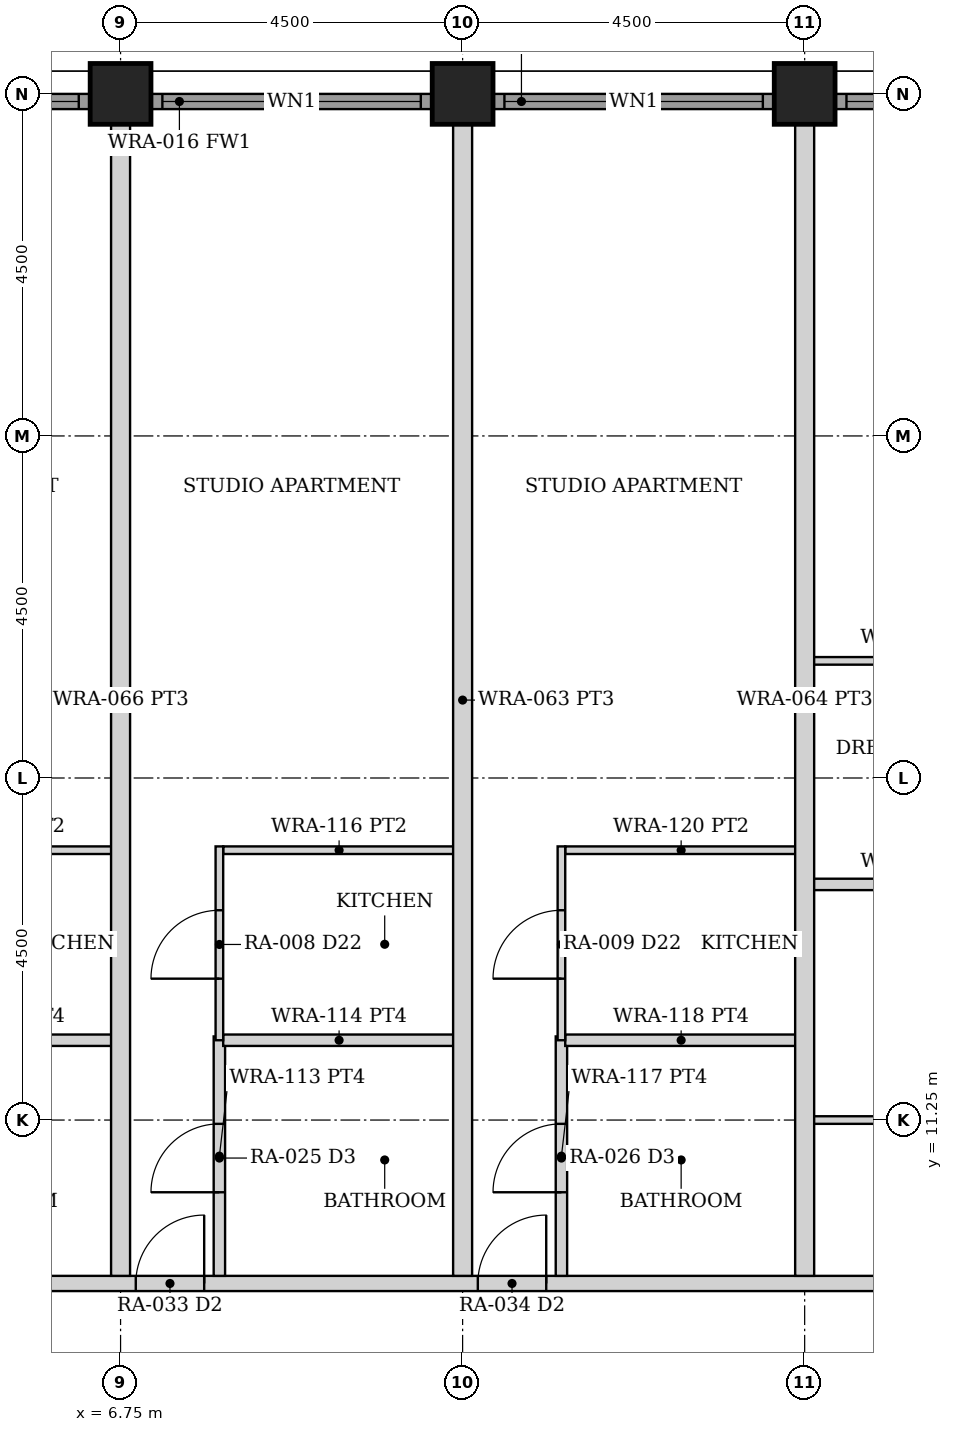
"""IFC4 building model, lengths in metres.
Left out: names, types, materials, properties, quantities, classifications, styles, units other than length and angle.
Written with IfcOpenShell. Run it as: python <this file> out.ifc"""

import sys

from ifc_helpers import new_model, si_unit, direction, frame, frame_2d, origin, origin_2d, place, context, subcontext, project, spatial, rectangle, hollow_rectangle, extrude, element, fill, save


model = new_model("IFC4")
c1 = context("Model", 3, precision=1e-05, world=origin(), true_north=direction((0.0, 1.0)))
c2 = subcontext(c1, "Body", "Model", "MODEL_VIEW")
j1 = project(units=[si_unit("LENGTHUNIT", "METRE"), si_unit("PLANEANGLEUNIT", "RADIAN")], contexts=[c1])
p1 = place(None, origin())
s1 = spatial("IfcSite", under=j1, at=p1, CompositionType="ELEMENT")
p2 = place(p1, origin())
s2 = spatial("IfcBuilding", under=s1, at=p2, CompositionType="ELEMENT")
p3 = place(p2, frame((0.0, 0.0, 26.5)))
s3 = spatial("IfcBuildingStorey", under=s2, at=p3, CompositionType="ELEMENT", Elevation=26.5)
for number, where, z_axis, x_axis in (
    (1, (6.75, 24.75, 0.0), (0.0, 0.0, 1.0), (0.0, 1.0, 0.0)),
    (2, (11.25, 24.75, 0.0), (0.0, 0.0, 1.0), (0.0, 1.0, 0.0)),
    (3, (15.75, 24.75, 0.0), (0.0, 0.0, 1.0), (0.0, 1.0, 0.0)),
):
    element("IfcColumn", number, at=place(p3, frame(where, z_axis=z_axis, x_axis=x_axis)), inside=s3, PredefinedType="COLUMN", context=c2, shape_type="SweptSolid", body=[
        extrude(hollow_rectangle(XDim=0.8, YDim=0.8, WallThickness=0.08, at=origin_2d()), origin(), (0.0, 0.0, 1.0), 3.5),
    ])
p4 = place(p3, frame((2.655, 24.65, 0.0), z_axis=(0.0, 0.0, 1.0), x_axis=(1.0, 0.0, 0.0)))
e4 = element("IfcWall", 4, at=p4, inside=s3, PredefinedType="SOLIDWALL", context=c2, shape_type="SweptSolid", body=[
    extrude(rectangle(XDim=3.69, YDim=0.2, at=frame_2d((1.845, 0.0))), origin(), (0.0, 0.0, 1.0), 2.379),
])
p5 = place(p4, frame((0.145, 0.0, 0.3)))
e5 = element("IfcOpeningElement", 5, at=p5, cuts=e4, PredefinedType="OPENING", context=c2, shape_type="SweptSolid", body=[
    extrude(rectangle(XDim=3.4, YDim=1.929, at=frame_2d((1.7, 0.964))), frame((0.0, 0.11, 0.0), z_axis=(0.0, -1.0, 0.0), x_axis=(1.0, 0.0, 0.0)), (0.0, 0.0, 1.0), 0.22),
])
p6 = place(p3, frame((7.155, 24.65, 0.0), z_axis=(0.0, 0.0, 1.0), x_axis=(1.0, 0.0, 0.0)))
e6 = element("IfcWall", 6, at=p6, inside=s3, PredefinedType="SOLIDWALL", context=c2, shape_type="SweptSolid", body=[
    extrude(rectangle(XDim=3.69, YDim=0.2, at=frame_2d((1.845, 0.0))), origin(), (0.0, 0.0, 1.0), 2.379),
])
p7 = place(p6, frame((0.145, 0.0, 0.3)))
e7 = element("IfcOpeningElement", 7, at=p7, cuts=e6, PredefinedType="OPENING", context=c2, shape_type="SweptSolid", body=[
    extrude(rectangle(XDim=3.4, YDim=1.929, at=frame_2d((1.7, 0.964))), frame((0.0, 0.11, 0.0), z_axis=(0.0, -1.0, 0.0), x_axis=(1.0, 0.0, 0.0)), (0.0, 0.0, 1.0), 0.22),
])
p8 = place(p3, frame((11.655, 24.65, 0.0), z_axis=(0.0, 0.0, 1.0), x_axis=(1.0, 0.0, 0.0)))
e8 = element("IfcWall", 8, at=p8, inside=s3, PredefinedType="SOLIDWALL", context=c2, shape_type="SweptSolid", body=[
    extrude(rectangle(XDim=3.69, YDim=0.2, at=frame_2d((1.845, 0.0))), origin(), (0.0, 0.0, 1.0), 2.379),
])
p9 = place(p8, frame((0.145, 0.0, 0.3)))
e9 = element("IfcOpeningElement", 9, at=p9, cuts=e8, PredefinedType="OPENING", context=c2, shape_type="SweptSolid", body=[
    extrude(rectangle(XDim=3.4, YDim=1.929, at=frame_2d((1.7, 0.964))), frame((0.0, 0.11, 0.0), z_axis=(0.0, -1.0, 0.0), x_axis=(1.0, 0.0, 0.0)), (0.0, 0.0, 1.0), 0.22),
])
p10 = place(p3, frame((16.155, 24.65, 0.0), z_axis=(0.0, 0.0, 1.0), x_axis=(1.0, 0.0, 0.0)))
e10 = element("IfcWall", 10, at=p10, inside=s3, PredefinedType="SOLIDWALL", context=c2, shape_type="SweptSolid", body=[
    extrude(rectangle(XDim=3.69, YDim=0.2, at=frame_2d((1.845, 0.0))), origin(), (0.0, 0.0, 1.0), 2.379),
])
p11 = place(p10, frame((0.145, 0.0, 0.3)))
e11 = element("IfcOpeningElement", 11, at=p11, cuts=e10, PredefinedType="OPENING", context=c2, shape_type="SweptSolid", body=[
    extrude(rectangle(XDim=3.4, YDim=1.929, at=frame_2d((1.7, 0.964))), frame((0.0, 0.11, 0.0), z_axis=(0.0, -1.0, 0.0), x_axis=(1.0, 0.0, 0.0)), (0.0, 0.0, 1.0), 0.22),
])
p12 = place(p3, frame((-24.55, 9.1, 0.0), z_axis=(0.0, 0.0, 1.0), x_axis=(1.0, 0.0, 0.0)))
e12 = element("IfcWall", 12, at=p12, inside=s3, PredefinedType="PARTITIONING", context=c2, shape_type="SweptSolid", body=[
    extrude(rectangle(XDim=49.1, YDim=0.2, at=frame_2d((24.55, 0.0))), origin(), (0.0, 0.0, 1.0), 2.373),
])
p13 = place(p12, frame((5.1, 0.0, 0.0)))
e13 = element("IfcOpeningElement", 13, at=p13, cuts=e12, PredefinedType="OPENING", context=c2, shape_type="SweptSolid", body=[
    extrude(rectangle(XDim=0.9, YDim=2.1, at=frame_2d((0.45, 1.05))), frame((0.0, 0.11, 0.0), z_axis=(0.0, -1.0, 0.0), x_axis=(1.0, 0.0, 0.0)), (0.0, 0.0, 1.0), 0.22),
])
p14 = place(p12, frame((9.0, 0.0, 0.0)))
e14 = element("IfcOpeningElement", 14, at=p14, cuts=e12, PredefinedType="OPENING", context=c2, shape_type="SweptSolid", body=[
    extrude(rectangle(XDim=0.9, YDim=2.1, at=frame_2d((0.45, 1.05))), frame((0.0, 0.11, 0.0), z_axis=(0.0, -1.0, 0.0), x_axis=(1.0, 0.0, 0.0)), (0.0, 0.0, 1.0), 0.22),
])
p15 = place(p12, frame((13.5, 0.0, 0.0)))
e15 = element("IfcOpeningElement", 15, at=p15, cuts=e12, PredefinedType="OPENING", context=c2, shape_type="SweptSolid", body=[
    extrude(rectangle(XDim=0.9, YDim=2.1, at=frame_2d((0.45, 1.05))), frame((0.0, 0.11, 0.0), z_axis=(0.0, -1.0, 0.0), x_axis=(1.0, 0.0, 0.0)), (0.0, 0.0, 1.0), 0.22),
])
p16 = place(p12, frame((18.0, 0.0, 0.0)))
e16 = element("IfcOpeningElement", 16, at=p16, cuts=e12, PredefinedType="OPENING", context=c2, shape_type="SweptSolid", body=[
    extrude(rectangle(XDim=0.9, YDim=2.1, at=frame_2d((0.45, 1.05))), frame((0.0, 0.11, 0.0), z_axis=(0.0, -1.0, 0.0), x_axis=(1.0, 0.0, 0.0)), (0.0, 0.0, 1.0), 0.22),
])
p17 = place(p12, frame((22.5, 0.0, 0.0)))
e17 = element("IfcOpeningElement", 17, at=p17, cuts=e12, PredefinedType="OPENING", context=c2, shape_type="SweptSolid", body=[
    extrude(rectangle(XDim=0.9, YDim=2.1, at=frame_2d((0.45, 1.05))), frame((0.0, 0.11, 0.0), z_axis=(0.0, -1.0, 0.0), x_axis=(1.0, 0.0, 0.0)), (0.0, 0.0, 1.0), 0.22),
])
p18 = place(p12, frame((27.0, 0.0, 0.0)))
e18 = element("IfcOpeningElement", 18, at=p18, cuts=e12, PredefinedType="OPENING", context=c2, shape_type="SweptSolid", body=[
    extrude(rectangle(XDim=0.9, YDim=2.1, at=frame_2d((0.45, 1.05))), frame((0.0, 0.11, 0.0), z_axis=(0.0, -1.0, 0.0), x_axis=(1.0, 0.0, 0.0)), (0.0, 0.0, 1.0), 0.22),
])
p19 = place(p12, frame((31.5, 0.0, 0.0)))
e19 = element("IfcOpeningElement", 19, at=p19, cuts=e12, PredefinedType="OPENING", context=c2, shape_type="SweptSolid", body=[
    extrude(rectangle(XDim=0.9, YDim=2.1, at=frame_2d((0.45, 1.05))), frame((0.0, 0.11, 0.0), z_axis=(0.0, -1.0, 0.0), x_axis=(1.0, 0.0, 0.0)), (0.0, 0.0, 1.0), 0.22),
])
p20 = place(p12, frame((36.0, 0.0, 0.0)))
e20 = element("IfcOpeningElement", 20, at=p20, cuts=e12, PredefinedType="OPENING", context=c2, shape_type="SweptSolid", body=[
    extrude(rectangle(XDim=0.9, YDim=2.1, at=frame_2d((0.45, 1.05))), frame((0.0, 0.11, 0.0), z_axis=(0.0, -1.0, 0.0), x_axis=(1.0, 0.0, 0.0)), (0.0, 0.0, 1.0), 0.22),
])
p21 = place(p12, frame((43.1, 0.0, 0.0)))
e21 = element("IfcOpeningElement", 21, at=p21, cuts=e12, PredefinedType="OPENING", context=c2, shape_type="SweptSolid", body=[
    extrude(rectangle(XDim=0.9, YDim=2.1, at=frame_2d((0.45, 1.05))), frame((0.0, 0.11, 0.0), z_axis=(0.0, -1.0, 0.0), x_axis=(1.0, 0.0, 0.0)), (0.0, 0.0, 1.0), 0.22),
])
p22 = place(p3, frame((3.6, 12.3, 0.0), z_axis=(0.0, 0.0, 1.0), x_axis=(1.0, 0.0, 0.0)))
e22 = element("IfcWall", 22, at=p22, inside=s3, PredefinedType="PARTITIONING", context=c2, shape_type="SweptSolid", body=[
    extrude(rectangle(XDim=3.05, YDim=0.15, at=frame_2d((1.525, 0.0))), origin(), (0.0, 0.0, 1.0), 2.373),
])
p23 = place(p3, frame((3.6, 14.8, 0.0), z_axis=(0.0, 0.0, 1.0), x_axis=(1.0, 0.0, 0.0)))
e23 = element("IfcWall", 23, at=p23, inside=s3, PredefinedType="PARTITIONING", context=c2, shape_type="SweptSolid", body=[
    extrude(rectangle(XDim=3.05, YDim=0.1, at=frame_2d((1.525, 0.0))), origin(), (0.0, 0.0, 1.0), 2.373),
])
p24 = place(p3, frame((8.05, 9.2, 0.0), z_axis=(0.0, 0.0, 1.0), x_axis=(0.0, 1.0, 0.0)))
e24 = element("IfcWall", 24, at=p24, inside=s3, PredefinedType="PARTITIONING", context=c2, shape_type="SweptSolid", body=[
    extrude(rectangle(XDim=3.15, YDim=0.15, at=frame_2d((1.575, 0.0))), origin(), (0.0, 0.0, 1.0), 2.373),
])
p25 = place(p24, frame((1.1, 0.0, 0.0)))
e25 = element("IfcOpeningElement", 25, at=p25, cuts=e24, PredefinedType="OPENING", context=c2, shape_type="SweptSolid", body=[
    extrude(rectangle(XDim=0.9, YDim=2.1, at=frame_2d((0.45, 1.05))), frame((0.0, 0.085, 0.0), z_axis=(0.0, -1.0, 0.0), x_axis=(1.0, 0.0, 0.0)), (0.0, 0.0, 1.0), 0.17),
])
p26 = place(p3, frame((8.1, 12.3, 0.0), z_axis=(0.0, 0.0, 1.0), x_axis=(1.0, 0.0, 0.0)))
e26 = element("IfcWall", 26, at=p26, inside=s3, PredefinedType="PARTITIONING", context=c2, shape_type="SweptSolid", body=[
    extrude(rectangle(XDim=3.05, YDim=0.15, at=frame_2d((1.525, 0.0))), origin(), (0.0, 0.0, 1.0), 2.373),
])
p27 = place(p3, frame((8.1, 14.8, 0.0), z_axis=(0.0, 0.0, 1.0), x_axis=(1.0, 0.0, 0.0)))
e27 = element("IfcWall", 27, at=p27, inside=s3, PredefinedType="PARTITIONING", context=c2, shape_type="SweptSolid", body=[
    extrude(rectangle(XDim=3.05, YDim=0.1, at=frame_2d((1.525, 0.0))), origin(), (0.0, 0.0, 1.0), 2.373),
])
p28 = place(p3, frame((8.05, 12.3, 0.0), z_axis=(0.0, 0.0, 1.0), x_axis=(0.0, 1.0, 0.0)))
e28 = element("IfcWall", 28, at=p28, inside=s3, PredefinedType="PARTITIONING", context=c2, shape_type="SweptSolid", body=[
    extrude(rectangle(XDim=2.55, YDim=0.1, at=frame_2d((1.275, 0.0))), origin(), (0.0, 0.0, 1.0), 2.373),
])
p29 = place(p28, frame((0.81, 0.0, 0.0)))
e29 = element("IfcOpeningElement", 29, at=p29, cuts=e28, PredefinedType="OPENING", context=c2, shape_type="SweptSolid", body=[
    extrude(rectangle(XDim=0.9, YDim=2.1, at=frame_2d((0.45, 1.05))), frame((0.0, 0.06, 0.0), z_axis=(0.0, -1.0, 0.0), x_axis=(1.0, 0.0, 0.0)), (0.0, 0.0, 1.0), 0.12),
])
p30 = place(p3, frame((12.55, 9.2, 0.0), z_axis=(0.0, 0.0, 1.0), x_axis=(0.0, 1.0, 0.0)))
e30 = element("IfcWall", 30, at=p30, inside=s3, PredefinedType="PARTITIONING", context=c2, shape_type="SweptSolid", body=[
    extrude(rectangle(XDim=3.15, YDim=0.15, at=frame_2d((1.575, 0.0))), origin(), (0.0, 0.0, 1.0), 2.373),
])
p31 = place(p30, frame((1.1, 0.0, 0.0)))
e31 = element("IfcOpeningElement", 31, at=p31, cuts=e30, PredefinedType="OPENING", context=c2, shape_type="SweptSolid", body=[
    extrude(rectangle(XDim=0.9, YDim=2.1, at=frame_2d((0.45, 1.05))), frame((0.0, 0.085, 0.0), z_axis=(0.0, -1.0, 0.0), x_axis=(1.0, 0.0, 0.0)), (0.0, 0.0, 1.0), 0.17),
])
p32 = place(p3, frame((12.6, 12.3, 0.0), z_axis=(0.0, 0.0, 1.0), x_axis=(1.0, 0.0, 0.0)))
e32 = element("IfcWall", 32, at=p32, inside=s3, PredefinedType="PARTITIONING", context=c2, shape_type="SweptSolid", body=[
    extrude(rectangle(XDim=3.05, YDim=0.15, at=frame_2d((1.525, 0.0))), origin(), (0.0, 0.0, 1.0), 2.373),
])
p33 = place(p3, frame((12.6, 14.8, 0.0), z_axis=(0.0, 0.0, 1.0), x_axis=(1.0, 0.0, 0.0)))
e33 = element("IfcWall", 33, at=p33, inside=s3, PredefinedType="PARTITIONING", context=c2, shape_type="SweptSolid", body=[
    extrude(rectangle(XDim=3.05, YDim=0.1, at=frame_2d((1.525, 0.0))), origin(), (0.0, 0.0, 1.0), 2.373),
])
p34 = place(p3, frame((12.55, 12.3, 0.0), z_axis=(0.0, 0.0, 1.0), x_axis=(0.0, 1.0, 0.0)))
e34 = element("IfcWall", 34, at=p34, inside=s3, PredefinedType="PARTITIONING", context=c2, shape_type="SweptSolid", body=[
    extrude(rectangle(XDim=2.55, YDim=0.1, at=frame_2d((1.275, 0.0))), origin(), (0.0, 0.0, 1.0), 2.373),
])
p35 = place(p34, frame((0.81, 0.0, 0.0)))
e35 = element("IfcOpeningElement", 35, at=p35, cuts=e34, PredefinedType="OPENING", context=c2, shape_type="SweptSolid", body=[
    extrude(rectangle(XDim=0.9, YDim=2.1, at=frame_2d((0.45, 1.05))), frame((0.0, 0.06, 0.0), z_axis=(0.0, -1.0, 0.0), x_axis=(1.0, 0.0, 0.0)), (0.0, 0.0, 1.0), 0.12),
])
p36 = place(p3, frame((15.85, 11.25, 0.0), z_axis=(0.0, 0.0, 1.0), x_axis=(1.0, 0.0, 0.0)))
e36 = element("IfcWall", 36, at=p36, inside=s3, PredefinedType="PARTITIONING", context=c2, shape_type="SweptSolid", body=[
    extrude(rectangle(XDim=8.5, YDim=0.1, at=frame_2d((4.25, 0.0))), origin(), (0.0, 0.0, 1.0), 2.373),
])
p37 = place(p36, frame((5.225, 0.0, 0.0)))
e37 = element("IfcOpeningElement", 37, at=p37, cuts=e36, PredefinedType="OPENING", context=c2, shape_type="SweptSolid", body=[
    extrude(rectangle(XDim=0.9, YDim=2.1, at=frame_2d((0.45, 1.05))), frame((0.0, 0.06, 0.0), z_axis=(0.0, -1.0, 0.0), x_axis=(1.0, 0.0, 0.0)), (0.0, 0.0, 1.0), 0.12),
])
p38 = place(p36, frame((7.25, 0.0, 0.0)))
e38 = element("IfcOpeningElement", 38, at=p38, cuts=e36, PredefinedType="OPENING", context=c2, shape_type="SweptSolid", body=[
    extrude(rectangle(XDim=0.9, YDim=2.1, at=frame_2d((0.45, 1.05))), frame((0.0, 0.06, 0.0), z_axis=(0.0, -1.0, 0.0), x_axis=(1.0, 0.0, 0.0)), (0.0, 0.0, 1.0), 0.12),
])
p39 = place(p36, frame((3.325, 0.0, 0.0)))
e39 = element("IfcOpeningElement", 39, at=p39, cuts=e36, PredefinedType="OPENING", context=c2, shape_type="SweptSolid", body=[
    extrude(rectangle(XDim=0.85, YDim=2.1, at=frame_2d((0.425, 1.05))), frame((0.0, 0.06, 0.0), z_axis=(0.0, -1.0, 0.0), x_axis=(1.0, 0.0, 0.0)), (0.0, 0.0, 1.0), 0.12),
])
p40 = place(p36, frame((1.08, 0.0, 0.0)))
e40 = element("IfcOpeningElement", 40, at=p40, cuts=e36, PredefinedType="OPENING", context=c2, shape_type="SweptSolid", body=[
    extrude(rectangle(XDim=0.9, YDim=2.1, at=frame_2d((0.45, 1.05))), frame((0.0, 0.06, 0.0), z_axis=(0.0, -1.0, 0.0), x_axis=(1.0, 0.0, 0.0)), (0.0, 0.0, 1.0), 0.12),
])
p41 = place(p3, frame((15.81, 14.35, 0.0), z_axis=(0.0, 0.0, 1.0), x_axis=(1.0, 0.0, 0.0)))
e41 = element("IfcWall", 41, at=p41, inside=s3, PredefinedType="PARTITIONING", context=c2, shape_type="SweptSolid", body=[
    extrude(rectangle(XDim=3.14, YDim=0.15, at=frame_2d((1.57, 0.0))), origin(), (0.0, 0.0, 1.0), 2.373),
])
p42 = place(p3, frame((15.81, 17.291, 0.0), z_axis=(0.0, 0.0, 1.0), x_axis=(1.0, 0.0, 0.0)))
e42 = element("IfcWall", 42, at=p42, inside=s3, PredefinedType="PARTITIONING", context=c2, shape_type="SweptSolid", body=[
    extrude(rectangle(XDim=3.14, YDim=0.1, at=frame_2d((1.57, 0.0))), origin(), (0.0, 0.0, 1.0), 2.373),
])
for number, where, z_axis, x_axis in (
    (43, (6.75, 9.2, 0.0), (0.0, 0.0, 1.0), (0.0, 1.0, 0.0)),
    (44, (11.25, 9.2, 0.0), (0.0, 0.0, 1.0), (0.0, 1.0, 0.0)),
    (45, (15.75, 9.2, 0.0), (0.0, 0.0, 1.0), (0.0, 1.0, 0.0)),
):
    element("IfcWall", number, at=place(p3, frame(where, z_axis=z_axis, x_axis=x_axis)), inside=s3, PredefinedType="PARTITIONING", context=c2, shape_type="SweptSolid", body=[
        extrude(rectangle(XDim=15.15, YDim=0.25, at=frame_2d((7.575, 0.0))), origin(), (0.0, 0.0, 1.0), 2.373),
    ])
p43 = place(p5, origin())
e46 = element("IfcWindow", 46, at=p43, inside=s3, PartitioningType="SINGLE_PANEL", PredefinedType="WINDOW", context=c2, shape_type="SweptSolid", body=[
    extrude(rectangle(XDim=3.4, YDim=1.929, at=frame_2d((1.7, 0.964))), frame((0.0, 0.03, 0.0), z_axis=(0.0, -1.0, 0.0), x_axis=(1.0, 0.0, 0.0)), (0.0, 0.0, 1.0), 0.06),
])
fill(e5, e46)
p44 = place(p7, origin())
e47 = element("IfcWindow", 47, at=p44, inside=s3, PartitioningType="SINGLE_PANEL", PredefinedType="WINDOW", context=c2, shape_type="SweptSolid", body=[
    extrude(rectangle(XDim=3.4, YDim=1.929, at=frame_2d((1.7, 0.964))), frame((0.0, 0.03, 0.0), z_axis=(0.0, -1.0, 0.0), x_axis=(1.0, 0.0, 0.0)), (0.0, 0.0, 1.0), 0.06),
])
fill(e7, e47)
p45 = place(p9, origin())
e48 = element("IfcWindow", 48, at=p45, inside=s3, PartitioningType="SINGLE_PANEL", PredefinedType="WINDOW", context=c2, shape_type="SweptSolid", body=[
    extrude(rectangle(XDim=3.4, YDim=1.929, at=frame_2d((1.7, 0.964))), frame((0.0, 0.03, 0.0), z_axis=(0.0, -1.0, 0.0), x_axis=(1.0, 0.0, 0.0)), (0.0, 0.0, 1.0), 0.06),
])
fill(e9, e48)
p46 = place(p11, origin())
e49 = element("IfcWindow", 49, at=p46, inside=s3, PartitioningType="SINGLE_PANEL", PredefinedType="WINDOW", context=c2, shape_type="SweptSolid", body=[
    extrude(rectangle(XDim=3.4, YDim=1.929, at=frame_2d((1.7, 0.964))), frame((0.0, 0.03, 0.0), z_axis=(0.0, -1.0, 0.0), x_axis=(1.0, 0.0, 0.0)), (0.0, 0.0, 1.0), 0.06),
])
fill(e11, e49)
p47 = place(p19, origin())
e50 = element("IfcDoor", 50, at=p47, inside=s3, OperationType="SINGLE_SWING_RIGHT", PredefinedType="DOOR", context=c2, shape_type="SweptSolid", body=[
    extrude(rectangle(XDim=0.9, YDim=2.1, at=frame_2d((0.45, 1.05))), frame((0.0, 0.025, 0.0), z_axis=(0.0, -1.0, 0.0), x_axis=(1.0, 0.0, 0.0)), (0.0, 0.0, 1.0), 0.05),
])
fill(e19, e50)
p48 = place(p25, origin())
e51 = element("IfcDoor", 51, at=p48, inside=s3, OperationType="SINGLE_SWING_LEFT", PredefinedType="DOOR", context=c2, shape_type="SweptSolid", body=[
    extrude(rectangle(XDim=0.9, YDim=2.1, at=frame_2d((0.45, 1.05))), frame((0.0, 0.025, 0.0), z_axis=(0.0, -1.0, 0.0), x_axis=(1.0, 0.0, 0.0)), (0.0, 0.0, 1.0), 0.05),
])
fill(e25, e51)
p49 = place(p29, origin())
e52 = element("IfcDoor", 52, at=p49, inside=s3, OperationType="SINGLE_SWING_LEFT", PredefinedType="DOOR", context=c2, shape_type="SweptSolid", body=[
    extrude(rectangle(XDim=0.9, YDim=2.1, at=frame_2d((0.45, 1.05))), frame((0.0, 0.025, 0.0), z_axis=(0.0, -1.0, 0.0), x_axis=(1.0, 0.0, 0.0)), (0.0, 0.0, 1.0), 0.05),
])
fill(e29, e52)
p50 = place(p20, origin())
e53 = element("IfcDoor", 53, at=p50, inside=s3, OperationType="SINGLE_SWING_RIGHT", PredefinedType="DOOR", context=c2, shape_type="SweptSolid", body=[
    extrude(rectangle(XDim=0.9, YDim=2.1, at=frame_2d((0.45, 1.05))), frame((0.0, 0.025, 0.0), z_axis=(0.0, -1.0, 0.0), x_axis=(1.0, 0.0, 0.0)), (0.0, 0.0, 1.0), 0.05),
])
fill(e20, e53)
p51 = place(p31, origin())
e54 = element("IfcDoor", 54, at=p51, inside=s3, OperationType="SINGLE_SWING_LEFT", PredefinedType="DOOR", context=c2, shape_type="SweptSolid", body=[
    extrude(rectangle(XDim=0.9, YDim=2.1, at=frame_2d((0.45, 1.05))), frame((0.0, 0.025, 0.0), z_axis=(0.0, -1.0, 0.0), x_axis=(1.0, 0.0, 0.0)), (0.0, 0.0, 1.0), 0.05),
])
fill(e31, e54)
p52 = place(p35, origin())
e55 = element("IfcDoor", 55, at=p52, inside=s3, OperationType="SINGLE_SWING_LEFT", PredefinedType="DOOR", context=c2, shape_type="SweptSolid", body=[
    extrude(rectangle(XDim=0.9, YDim=2.1, at=frame_2d((0.45, 1.05))), frame((0.0, 0.025, 0.0), z_axis=(0.0, -1.0, 0.0), x_axis=(1.0, 0.0, 0.0)), (0.0, 0.0, 1.0), 0.05),
])
fill(e35, e55)
save(model, sys.argv[1])
